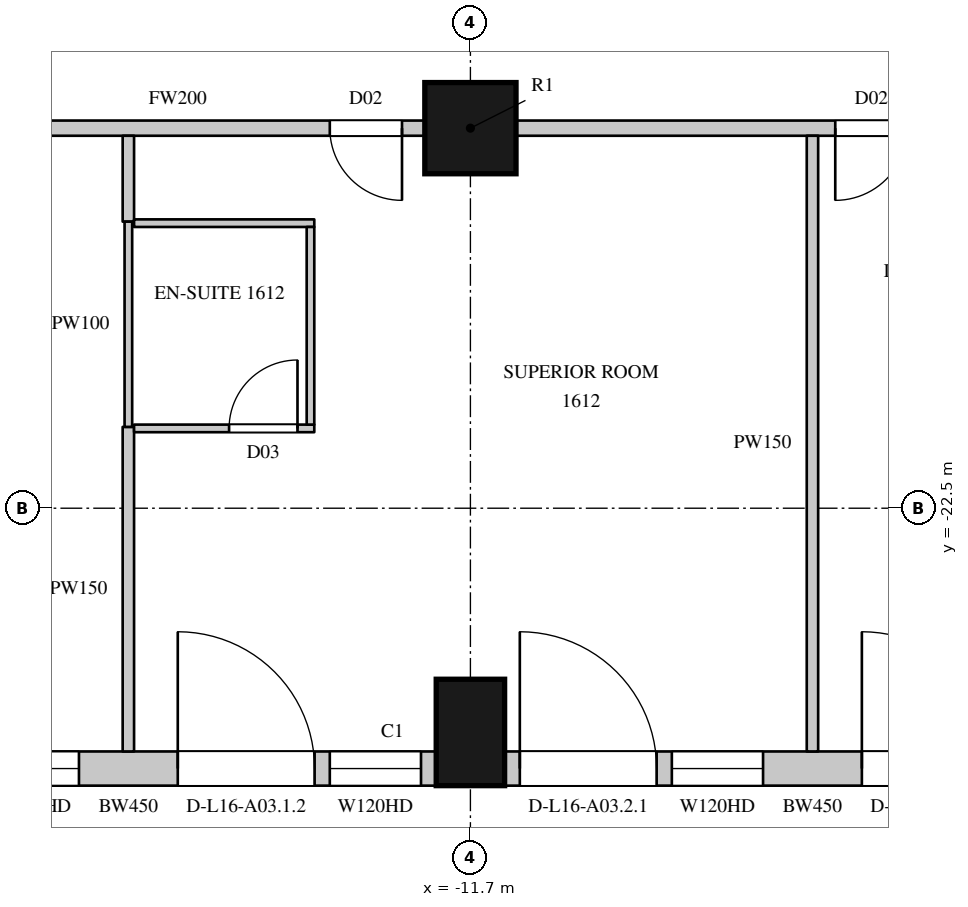
"""IFC4 building model, lengths in metres.
Left out: names, types, materials, properties, quantities, classifications, styles, units other than length and angle.
Written with IfcOpenShell. Run it as: python <this file> out.ifc"""

import sys

from ifc_helpers import new_model, si_unit, direction, frame, frame_2d, origin, origin_2d, place, context, subcontext, project, spatial, rectangle, circle, extrude, element, fill, save


model = new_model("IFC4")
c1 = context("Model", 3, precision=1e-05, world=origin(), true_north=direction((0.0, 1.0)))
c2 = subcontext(c1, "Body", "Model", "MODEL_VIEW")
j1 = project(units=[si_unit("LENGTHUNIT", "METRE"), si_unit("PLANEANGLEUNIT", "RADIAN")], contexts=[c1])
p1 = place(None, origin())
s1 = spatial("IfcSite", under=j1, at=p1, CompositionType="ELEMENT")
p2 = place(p1, origin())
s2 = spatial("IfcBuilding", under=s1, at=p2, CompositionType="ELEMENT")
p3 = place(p2, frame((0.0, 0.0, 87.9)))
s3 = spatial("IfcBuildingStorey", under=s2, at=p3, CompositionType="ELEMENT", Elevation=87.9)
p4 = place(p3, frame((-11.7, -25.45, 0.0), z_axis=(0.0, 0.0, 1.0), x_axis=(1.0, 0.0, 0.0)))
e1 = element("IfcColumn", 1, at=p4, inside=s3, PredefinedType="COLUMN", context=c2, shape_type="SweptSolid", body=[
    extrude(rectangle(XDim=0.9, YDim=1.4, at=origin_2d()), origin(), (0.0, 0.0, 1.0), 3.6),
])
p5 = place(p3, frame((-11.7, -17.5, 0.0), z_axis=(0.0, 0.0, 1.0), x_axis=(1.0, 0.0, 0.0)))
e2 = element("IfcColumn", 2, at=p5, inside=s3, PredefinedType="COLUMN", context=c2, shape_type="SweptSolid", body=[
    extrude(circle(Radius=0.6, at=origin_2d()), origin(), (0.0, 0.0, 1.0), 3.6),
])
p6 = place(p3, frame((-20.25, -25.925, 0.0), z_axis=(0.0, 0.0, 1.0), x_axis=(1.0, 0.0, 0.0)))
e3 = element("IfcWall", 3, at=p6, inside=s3, PredefinedType="SOLIDWALL", context=c2, shape_type="SweptSolid", body=[
    extrude(rectangle(XDim=8.1, YDim=0.45, at=frame_2d((4.05, 0.0))), origin(), (0.0, 0.0, 1.0), 3.3),
])
p7 = place(p6, frame((0.2, 0.0, 0.0)))
e4 = element("IfcOpeningElement", 4, at=p7, cuts=e3, PredefinedType="OPENING", context=c2, shape_type="SweptSolid", body=[
    extrude(rectangle(XDim=1.8, YDim=2.4, at=frame_2d((0.9, 1.2))), frame((0.0, 0.235, 0.0), z_axis=(0.0, -1.0, 0.0), x_axis=(1.0, 0.0, 0.0)), (0.0, 0.0, 1.0), 0.47),
])
p8 = place(p6, frame((2.2, 0.0, 1.05)))
e5 = element("IfcOpeningElement", 5, at=p8, cuts=e3, PredefinedType="OPENING", context=c2, shape_type="SweptSolid", body=[
    extrude(rectangle(XDim=1.2, YDim=2.0, at=frame_2d((0.6, 1.0))), frame((0.0, 0.235, 0.0), z_axis=(0.0, -1.0, 0.0), x_axis=(1.0, 0.0, 0.0)), (0.0, 0.0, 1.0), 0.47),
])
p9 = place(p6, frame((4.7, 0.0, 0.0)))
e6 = element("IfcOpeningElement", 6, at=p9, cuts=e3, PredefinedType="OPENING", context=c2, shape_type="SweptSolid", body=[
    extrude(rectangle(XDim=1.8, YDim=2.4, at=frame_2d((0.9, 1.2))), frame((0.0, 0.235, 0.0), z_axis=(0.0, -1.0, 0.0), x_axis=(1.0, 0.0, 0.0)), (0.0, 0.0, 1.0), 0.47),
])
p10 = place(p6, frame((6.7, 0.0, 1.05)))
e7 = element("IfcOpeningElement", 7, at=p10, cuts=e3, PredefinedType="OPENING", context=c2, shape_type="SweptSolid", body=[
    extrude(rectangle(XDim=1.2, YDim=2.0, at=frame_2d((0.6, 1.0))), frame((0.0, 0.235, 0.0), z_axis=(0.0, -1.0, 0.0), x_axis=(1.0, 0.0, 0.0)), (0.0, 0.0, 1.0), 0.47),
])
p11 = place(p3, frame((-11.25, -25.925, 0.0), z_axis=(0.0, 0.0, 1.0), x_axis=(1.0, 0.0, 0.0)))
e8 = element("IfcWall", 8, at=p11, inside=s3, PredefinedType="SOLIDWALL", context=c2, shape_type="SweptSolid", body=[
    extrude(rectangle(XDim=8.1, YDim=0.45, at=frame_2d((4.05, 0.0))), origin(), (0.0, 0.0, 1.0), 3.3),
])
p12 = place(p11, frame((0.2, 0.0, 0.0)))
e9 = element("IfcOpeningElement", 9, at=p12, cuts=e8, PredefinedType="OPENING", context=c2, shape_type="SweptSolid", body=[
    extrude(rectangle(XDim=1.8, YDim=2.4, at=frame_2d((0.9, 1.2))), frame((0.0, 0.235, 0.0), z_axis=(0.0, -1.0, 0.0), x_axis=(1.0, 0.0, 0.0)), (0.0, 0.0, 1.0), 0.47),
])
p13 = place(p11, frame((2.2, 0.0, 1.05)))
e10 = element("IfcOpeningElement", 10, at=p13, cuts=e8, PredefinedType="OPENING", context=c2, shape_type="SweptSolid", body=[
    extrude(rectangle(XDim=1.2, YDim=2.0, at=frame_2d((0.6, 1.0))), frame((0.0, 0.235, 0.0), z_axis=(0.0, -1.0, 0.0), x_axis=(1.0, 0.0, 0.0)), (0.0, 0.0, 1.0), 0.47),
])
p14 = place(p11, frame((4.7, 0.0, 0.0)))
e11 = element("IfcOpeningElement", 11, at=p14, cuts=e8, PredefinedType="OPENING", context=c2, shape_type="SweptSolid", body=[
    extrude(rectangle(XDim=1.8, YDim=2.4, at=frame_2d((0.9, 1.2))), frame((0.0, 0.235, 0.0), z_axis=(0.0, -1.0, 0.0), x_axis=(1.0, 0.0, 0.0)), (0.0, 0.0, 1.0), 0.47),
])
p15 = place(p11, frame((6.7, 0.0, 1.05)))
e12 = element("IfcOpeningElement", 12, at=p15, cuts=e8, PredefinedType="OPENING", context=c2, shape_type="SweptSolid", body=[
    extrude(rectangle(XDim=1.2, YDim=2.0, at=frame_2d((0.6, 1.0))), frame((0.0, 0.235, 0.0), z_axis=(0.0, -1.0, 0.0), x_axis=(1.0, 0.0, 0.0)), (0.0, 0.0, 1.0), 0.47),
])
p16 = place(p3, frame((-18.8, -17.5, 0.0), z_axis=(0.0, 0.0, 1.0), x_axis=(1.0, 0.0, 0.0)))
e13 = element("IfcWall", 13, at=p16, inside=s3, PredefinedType="PARTITIONING", context=c2, shape_type="SweptSolid", body=[
    extrude(rectangle(XDim=6.5, YDim=0.2, at=frame_2d((3.25, 0.0))), origin(), (0.0, 0.0, 1.0), 2.75),
])
p17 = place(p16, frame((5.25, 0.0, 0.0)))
e14 = element("IfcOpeningElement", 14, at=p17, cuts=e13, PredefinedType="OPENING", context=c2, shape_type="SweptSolid", body=[
    extrude(rectangle(XDim=0.95, YDim=2.2, at=frame_2d((0.475, 1.1))), frame((0.0, 0.11, 0.0), z_axis=(0.0, -1.0, 0.0), x_axis=(1.0, 0.0, 0.0)), (0.0, 0.0, 1.0), 0.22),
])
p18 = place(p3, frame((-11.1, -17.5, 0.0), z_axis=(0.0, 0.0, 1.0), x_axis=(1.0, 0.0, 0.0)))
e15 = element("IfcWall", 15, at=p18, inside=s3, PredefinedType="PARTITIONING", context=c2, shape_type="SweptSolid", body=[
    extrude(rectangle(XDim=7.8, YDim=0.2, at=frame_2d((3.9, 0.0))), origin(), (0.0, 0.0, 1.0), 2.75),
])
p19 = place(p18, frame((4.2, 0.0, 0.0)))
e16 = element("IfcOpeningElement", 16, at=p19, cuts=e15, PredefinedType="OPENING", context=c2, shape_type="SweptSolid", body=[
    extrude(rectangle(XDim=0.95, YDim=2.2, at=frame_2d((0.475, 1.1))), frame((0.0, 0.11, 0.0), z_axis=(0.0, -1.0, 0.0), x_axis=(1.0, 0.0, 0.0)), (0.0, 0.0, 1.0), 0.22),
])
p20 = place(p3, frame((-16.2, -25.7, 0.0), z_axis=(0.0, 0.0, 1.0), x_axis=(0.0, 1.0, 0.0)))
e17 = element("IfcWall", 17, at=p20, inside=s3, PredefinedType="PARTITIONING", context=c2, shape_type="SweptSolid", body=[
    extrude(rectangle(XDim=4.27, YDim=0.15, at=frame_2d((2.135, 0.0))), origin(), (0.0, 0.0, 1.0), 2.65),
])
p21 = place(p3, frame((-16.2, -18.73, 0.0), z_axis=(0.0, 0.0, 1.0), x_axis=(0.0, 1.0, 0.0)))
e18 = element("IfcWall", 18, at=p21, inside=s3, PredefinedType="PARTITIONING", context=c2, shape_type="SweptSolid", body=[
    extrude(rectangle(XDim=1.13, YDim=0.15, at=frame_2d((0.565, 0.0))), origin(), (0.0, 0.0, 1.0), 2.65),
])
p22 = place(p3, frame((-7.2, -25.7, 0.0), z_axis=(0.0, 0.0, 1.0), x_axis=(0.0, 1.0, 0.0)))
e19 = element("IfcWall", 19, at=p22, inside=s3, PredefinedType="PARTITIONING", context=c2, shape_type="SweptSolid", body=[
    extrude(rectangle(XDim=8.1, YDim=0.15, at=frame_2d((4.05, 0.0))), origin(), (0.0, 0.0, 1.0), 2.65),
])
p23 = place(p3, frame((-16.2, -21.43, 0.0), z_axis=(0.0, 0.0, 1.0), x_axis=(0.0, 1.0, 0.0)))
e20 = element("IfcWall", 20, at=p23, inside=s3, PredefinedType="PARTITIONING", context=c2, shape_type="SweptSolid", body=[
    extrude(rectangle(XDim=2.7, YDim=0.1, at=frame_2d((1.35, 0.0))), origin(), (0.0, 0.0, 1.0), 2.65),
])
p24 = place(p3, frame((-16.125, -21.45, 0.0), z_axis=(0.0, 0.0, 1.0), x_axis=(1.0, 0.0, 0.0)))
e21 = element("IfcWall", 21, at=p24, inside=s3, PredefinedType="PARTITIONING", context=c2, shape_type="SweptSolid", body=[
    extrude(rectangle(XDim=2.371, YDim=0.1, at=frame_2d((1.186, 0.0))), origin(), (0.0, 0.0, 1.0), 3.3),
])
p25 = place(p24, frame((1.25, 0.0, 0.0)))
e22 = element("IfcOpeningElement", 22, at=p25, cuts=e21, PredefinedType="OPENING", context=c2, shape_type="SweptSolid", body=[
    extrude(rectangle(XDim=0.9, YDim=2.2, at=frame_2d((0.45, 1.1))), frame((0.0, 0.06, 0.0), z_axis=(0.0, -1.0, 0.0), x_axis=(1.0, 0.0, 0.0)), (0.0, 0.0, 1.0), 0.12),
])
p26 = place(p3, frame((-16.125, -18.75, 0.0), z_axis=(0.0, 0.0, 1.0), x_axis=(1.0, 0.0, 0.0)))
e23 = element("IfcWall", 23, at=p26, inside=s3, PredefinedType="PARTITIONING", context=c2, shape_type="SweptSolid", body=[
    extrude(rectangle(XDim=2.371, YDim=0.1, at=frame_2d((1.186, 0.0))), origin(), (0.0, 0.0, 1.0), 3.3),
])
p27 = place(p3, frame((-13.804, -21.4, 0.0), z_axis=(0.0, 0.0, 1.0), x_axis=(0.0, 1.0, 0.0)))
e24 = element("IfcWall", 24, at=p27, inside=s3, PredefinedType="PARTITIONING", context=c2, shape_type="SweptSolid", body=[
    extrude(rectangle(XDim=2.6, YDim=0.1, at=frame_2d((1.3, 0.0))), origin(), (0.0, 0.0, 1.0), 3.3),
])
p28 = place(p8, origin())
e25 = element("IfcWindow", 25, at=p28, inside=s3, PartitioningType="SINGLE_PANEL", PredefinedType="WINDOW", context=c2, shape_type="SweptSolid", body=[
    extrude(rectangle(XDim=1.2, YDim=2.0, at=frame_2d((0.6, 1.0))), frame((0.0, 0.135, 0.0), z_axis=(0.0, -1.0, 0.0), x_axis=(1.0, 0.0, 0.0)), (0.0, 0.0, 1.0), 0.06),
])
fill(e5, e25)
p29 = place(p9, origin())
e26 = element("IfcDoor", 26, at=p29, inside=s3, OperationType="SLIDING_TO_LEFT", PredefinedType="DOOR", context=c2, shape_type="SweptSolid", body=[
    extrude(rectangle(XDim=1.8, YDim=2.4, at=frame_2d((0.9, 1.2))), frame((0.0, 0.13, 0.0), z_axis=(0.0, -1.0, 0.0), x_axis=(1.0, 0.0, 0.0)), (0.0, 0.0, 1.0), 0.05),
])
fill(e6, e26)
p30 = place(p10, origin())
e27 = element("IfcWindow", 27, at=p30, inside=s3, PartitioningType="SINGLE_PANEL", PredefinedType="WINDOW", context=c2, shape_type="SweptSolid", body=[
    extrude(rectangle(XDim=1.2, YDim=2.0, at=frame_2d((0.6, 1.0))), frame((0.0, 0.135, 0.0), z_axis=(0.0, -1.0, 0.0), x_axis=(1.0, 0.0, 0.0)), (0.0, 0.0, 1.0), 0.06),
])
fill(e7, e27)
p31 = place(p12, origin())
e28 = element("IfcDoor", 28, at=p31, inside=s3, OperationType="SLIDING_TO_LEFT", PredefinedType="DOOR", context=c2, shape_type="SweptSolid", body=[
    extrude(rectangle(XDim=1.8, YDim=2.4, at=frame_2d((0.9, 1.2))), frame((0.0, 0.13, 0.0), z_axis=(0.0, -1.0, 0.0), x_axis=(1.0, 0.0, 0.0)), (0.0, 0.0, 1.0), 0.05),
])
fill(e9, e28)
p32 = place(p13, origin())
e29 = element("IfcWindow", 29, at=p32, inside=s3, PartitioningType="SINGLE_PANEL", PredefinedType="WINDOW", context=c2, shape_type="SweptSolid", body=[
    extrude(rectangle(XDim=1.2, YDim=2.0, at=frame_2d((0.6, 1.0))), frame((0.0, 0.135, 0.0), z_axis=(0.0, -1.0, 0.0), x_axis=(1.0, 0.0, 0.0)), (0.0, 0.0, 1.0), 0.06),
])
fill(e10, e29)
p33 = place(p14, origin())
e30 = element("IfcDoor", 30, at=p33, inside=s3, OperationType="SLIDING_TO_LEFT", PredefinedType="DOOR", context=c2, shape_type="SweptSolid", body=[
    extrude(rectangle(XDim=1.8, YDim=2.4, at=frame_2d((0.9, 1.2))), frame((0.0, 0.13, 0.0), z_axis=(0.0, -1.0, 0.0), x_axis=(1.0, 0.0, 0.0)), (0.0, 0.0, 1.0), 0.05),
])
fill(e11, e30)
p34 = place(p17, origin())
e31 = element("IfcDoor", 31, at=p34, inside=s3, OperationType="SINGLE_SWING_LEFT", PredefinedType="DOOR", context=c2, shape_type="SweptSolid", body=[
    extrude(rectangle(XDim=0.95, YDim=2.2, at=frame_2d((0.475, 1.1))), frame((0.0, 0.025, 0.0), z_axis=(0.0, -1.0, 0.0), x_axis=(1.0, 0.0, 0.0)), (0.0, 0.0, 1.0), 0.05),
])
fill(e14, e31)
p35 = place(p25, origin())
e32 = element("IfcDoor", 32, at=p35, inside=s3, OperationType="SINGLE_SWING_RIGHT", PredefinedType="DOOR", context=c2, shape_type="SweptSolid", body=[
    extrude(rectangle(XDim=0.9, YDim=2.2, at=frame_2d((0.45, 1.1))), frame((0.0, 0.025, 0.0), z_axis=(0.0, -1.0, 0.0), x_axis=(1.0, 0.0, 0.0)), (0.0, 0.0, 1.0), 0.05),
])
fill(e22, e32)
p36 = place(p19, origin())
e33 = element("IfcDoor", 33, at=p36, inside=s3, OperationType="SINGLE_SWING_RIGHT", PredefinedType="DOOR", context=c2, shape_type="SweptSolid", body=[
    extrude(rectangle(XDim=0.95, YDim=2.2, at=frame_2d((0.475, 1.1))), frame((0.0, 0.025, 0.0), z_axis=(0.0, -1.0, 0.0), x_axis=(1.0, 0.0, 0.0)), (0.0, 0.0, 1.0), 0.05),
])
fill(e16, e33)
save(model, sys.argv[1])
